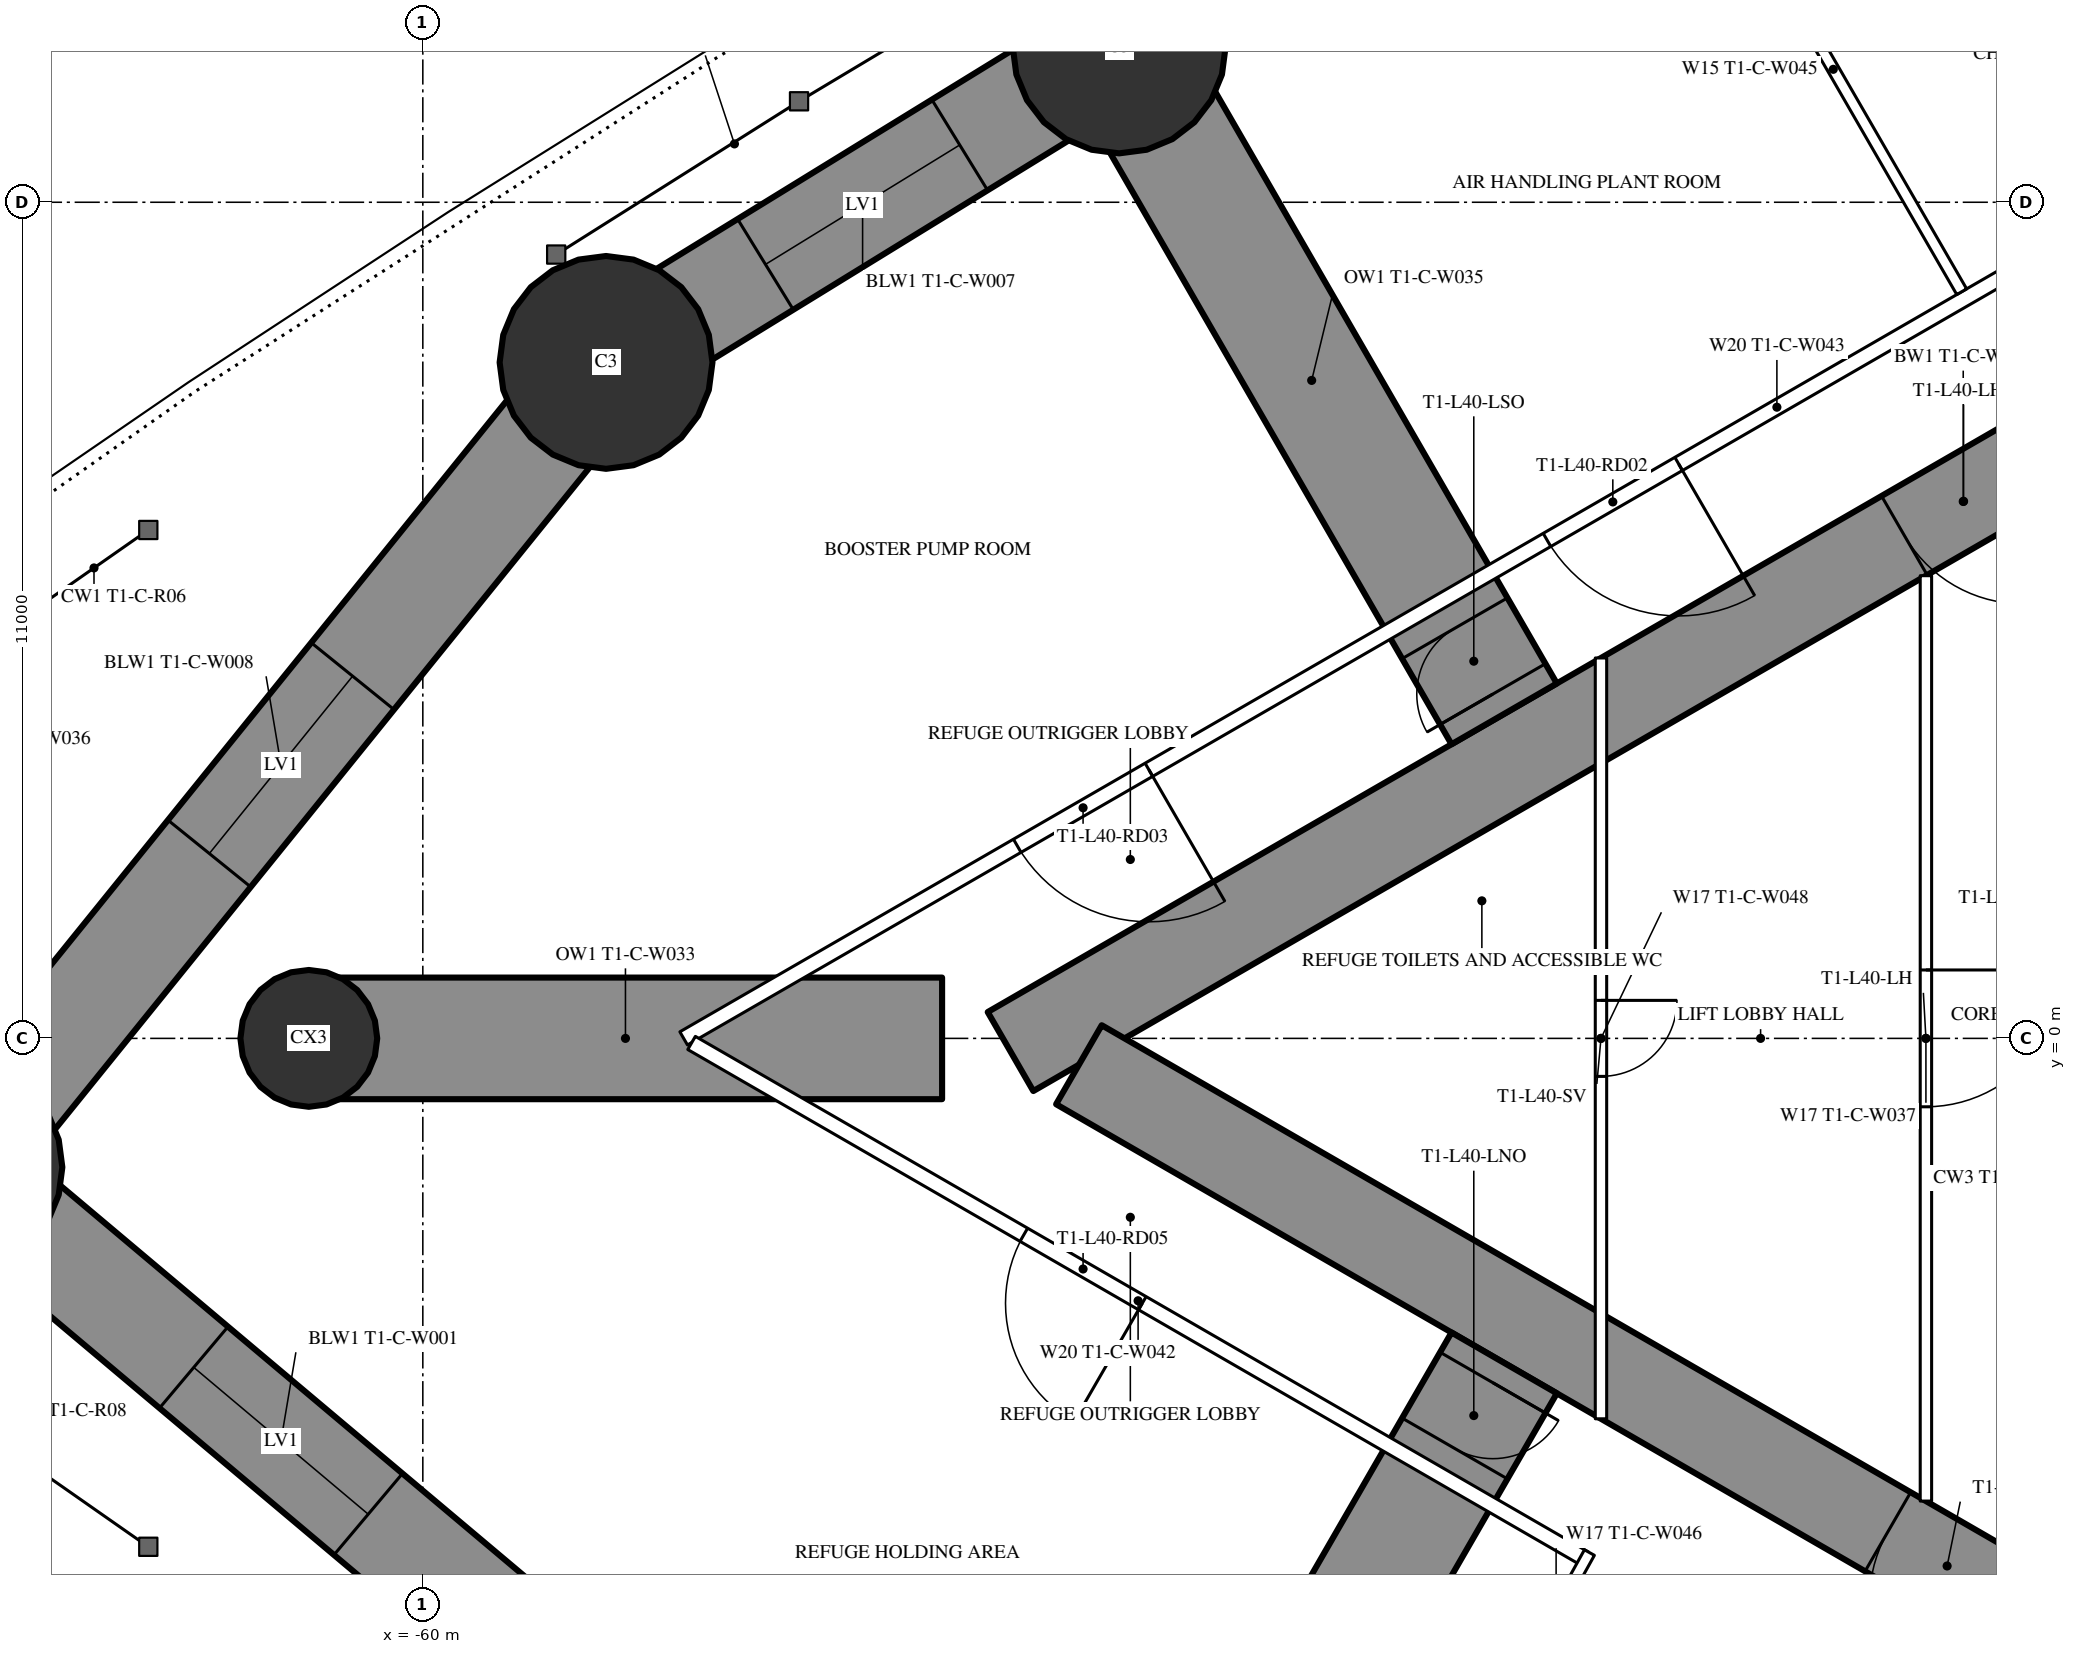
"""IFC4 building model, lengths in metres.
Left out: names, types, materials, properties, quantities, classifications, styles, units other than length and angle.
Written with IfcOpenShell. Run it as: python <this file> out.ifc"""

import sys

from ifc_helpers import new_model, si_unit, direction, frame, frame_2d, origin, origin_2d, place, context, subcontext, project, spatial, rectangle, circle, extrude, element, fill, save


model = new_model("IFC4")
c1 = context("Model", 3, precision=1e-05, world=origin(), true_north=direction((0.0, 1.0)))
c2 = subcontext(c1, "Body", "Model", "MODEL_VIEW")
j1 = project(units=[si_unit("LENGTHUNIT", "METRE"), si_unit("PLANEANGLEUNIT", "RADIAN")], contexts=[c1])
p1 = place(None, origin())
s1 = spatial("IfcSite", under=j1, at=p1, CompositionType="ELEMENT")
p2 = place(p1, origin())
s2 = spatial("IfcBuilding", under=s1, at=p2, CompositionType="ELEMENT")
p3 = place(p2, frame((0.0, 0.0, 152.7)))
s3 = spatial("IfcBuildingStorey", under=s2, at=p3, CompositionType="ELEMENT", Elevation=152.7)
for number, where, z_axis, x_axis in (
    (1, (-66.143, -1.695, 0.0), (0.0, 0.0, 1.0), (1.0, 0.0, 0.0)),
    (2, (-50.839, 13.043, 0.0), (0.0, 0.0, 1.0), (1.0, 0.0, 0.0)),
    (3, (-57.59, 8.893, 0.0), (0.0, 0.0, 1.0), (1.0, 0.0, 0.0)),
):
    element("IfcColumn", number, at=place(p3, frame(where, z_axis=z_axis, x_axis=x_axis)), inside=s3, PredefinedType="COLUMN", context=c2, shape_type="SweptSolid", body=[
        extrude(circle(Radius=1.4, at=origin_2d()), origin(), (0.0, 0.0, 1.0), 3.6),
    ])
p4 = place(p3, frame((-61.5, 0.0, 0.0), z_axis=(0.0, 0.0, 1.0), x_axis=(1.0, 0.0, 0.0)))
e4 = element("IfcColumn", 4, at=p4, inside=s3, PredefinedType="COLUMN", context=c2, shape_type="SweptSolid", body=[
    extrude(circle(Radius=0.9, at=origin_2d()), origin(), (0.0, 0.0, 1.0), 3.6),
])
p5 = place(p3, frame((-27.2, 14.3, 0.0), z_axis=(0.0, 0.0, 1.0), x_axis=(-0.866026593062, -0.499997940104, 0.0)))
e5 = element("IfcWall", 5, at=p5, inside=s3, PredefinedType="SHEAR", context=c2, shape_type="SweptSolid", body=[
    extrude(rectangle(XDim=28.946, YDim=1.2, at=frame_2d((14.473, 0.0))), origin(), (0.0, 0.0, 1.0), 3.6),
])
p6 = place(p5, frame((4.6, 0.0, 0.0)))
e6 = element("IfcOpeningElement", 6, at=p6, cuts=e5, PredefinedType="OPENING", context=c2, shape_type="SweptSolid", body=[
    extrude(rectangle(XDim=1.0, YDim=2.2, at=frame_2d((0.5, 1.1))), frame((0.0, 0.61, 0.0), z_axis=(0.0, -1.0, 0.0), x_axis=(1.0, 0.0, 0.0)), (0.0, 0.0, 1.0), 1.22),
])
p7 = place(p5, frame((13.568, 0.0, 0.0)))
e7 = element("IfcOpeningElement", 7, at=p7, cuts=e5, PredefinedType="OPENING", context=c2, shape_type="SweptSolid", body=[
    extrude(rectangle(XDim=1.8, YDim=2.04, at=frame_2d((0.9, 1.02))), frame((0.0, 0.61, 0.0), z_axis=(0.0, -1.0, 0.0), x_axis=(1.0, 0.0, 0.0)), (0.0, 0.0, 1.0), 1.22),
])
p8 = place(p3, frame((-27.2, -14.3, 0.0), z_axis=(0.0, 0.0, 1.0), x_axis=(-0.866024021859, 0.500002393557, 0.0)))
e8 = element("IfcWall", 8, at=p8, inside=s3, PredefinedType="SHEAR", context=c2, shape_type="SweptSolid", body=[
    extrude(rectangle(XDim=27.907, YDim=1.2, at=frame_2d((13.954, 0.0))), origin(), (0.0, 0.0, 1.0), 3.6),
])
p9 = place(p8, frame((4.6, 0.0, 0.0)))
e9 = element("IfcOpeningElement", 9, at=p9, cuts=e8, PredefinedType="OPENING", context=c2, shape_type="SweptSolid", body=[
    extrude(rectangle(XDim=1.0, YDim=2.2, at=frame_2d((0.5, 1.1))), frame((0.0, 0.61, 0.0), z_axis=(0.0, -1.0, 0.0), x_axis=(1.0, 0.0, 0.0)), (0.0, 0.0, 1.0), 1.22),
])
p10 = place(p8, frame((13.818, 0.0, 0.0)))
e10 = element("IfcOpeningElement", 10, at=p10, cuts=e8, PredefinedType="OPENING", context=c2, shape_type="SweptSolid", body=[
    extrude(rectangle(XDim=1.8, YDim=2.2, at=frame_2d((0.9, 1.1))), frame((0.0, 0.61, 0.0), z_axis=(0.0, -1.0, 0.0), x_axis=(1.0, 0.0, 0.0)), (0.0, 0.0, 1.0), 1.22),
])
p11 = place(p3, frame((-45.773, 4.27, 0.0), z_axis=(0.0, 0.0, 1.0), x_axis=(-0.499995723283, 0.866027872934, 0.0)))
e11 = element("IfcWall", 11, at=p11, inside=s3, PredefinedType="SHEAR", context=c2, shape_type="SweptSolid", body=[
    extrude(rectangle(XDim=10.131, YDim=1.6, at=frame_2d((5.065, 0.0))), origin(), (0.0, 0.0, 1.0), 3.6),
])
p12 = place(p11, frame((0.3, 0.0, 0.0)))
e12 = element("IfcOpeningElement", 12, at=p12, cuts=e11, PredefinedType="OPENING", context=c2, shape_type="SweptSolid", body=[
    extrude(rectangle(XDim=1.0, YDim=2.2, at=frame_2d((0.5, 1.1))), frame((0.0, 0.81, 0.0), z_axis=(0.0, -1.0, 0.0), x_axis=(1.0, 0.0, 0.0)), (0.0, 0.0, 1.0), 1.62),
])
p13 = place(p3, frame((-53.168, 0.0, 0.0), z_axis=(0.0, 0.0, 1.0), x_axis=(-1.0, 0.0, 0.0)))
e13 = element("IfcWall", 13, at=p13, inside=s3, PredefinedType="SHEAR", context=c2, shape_type="SweptSolid", body=[
    extrude(rectangle(XDim=8.332, YDim=1.6, at=frame_2d((4.166, 0.0))), origin(), (0.0, 0.0, 1.0), 3.6),
])
p14 = place(p3, frame((-45.773, -4.27, 0.0), z_axis=(0.0, 0.0, 1.0), x_axis=(-0.499995723283, -0.866027872934, 0.0)))
e14 = element("IfcWall", 14, at=p14, inside=s3, PredefinedType="SHEAR", context=c2, shape_type="SweptSolid", body=[
    extrude(rectangle(XDim=10.131, YDim=1.6, at=frame_2d((5.065, 0.0))), origin(), (0.0, 0.0, 1.0), 3.6),
])
p15 = place(p14, frame((0.3, 0.0, 0.0)))
e15 = element("IfcOpeningElement", 15, at=p15, cuts=e14, PredefinedType="OPENING", context=c2, shape_type="SweptSolid", body=[
    extrude(rectangle(XDim=1.0, YDim=2.2, at=frame_2d((0.5, 1.1))), frame((0.0, 0.81, 0.0), z_axis=(0.0, -1.0, 0.0), x_axis=(1.0, 0.0, 0.0)), (0.0, 0.0, 1.0), 1.62),
])
p16 = place(p3, frame((-43.9, 16.871, 0.0), z_axis=(0.0, 0.0, 1.0), x_axis=(-0.875577684027, -0.483077342911, 0.0)))
e16 = element("IfcWall", 16, at=p16, inside=s3, PredefinedType="SHEAR", context=c2, shape_type="SweptSolid", body=[
    extrude(rectangle(XDim=7.925, YDim=1.4, at=frame_2d((3.962, 0.0))), origin(), (0.0, 0.0, 1.0), 3.6),
])
p17 = place(p16, frame((2.462, 0.0, 0.6)))
e17 = element("IfcOpeningElement", 17, at=p17, cuts=e16, PredefinedType="OPENING", context=c2, shape_type="SweptSolid", body=[
    extrude(rectangle(XDim=3.0, YDim=1.2, at=frame_2d((1.5, 0.6))), frame((0.0, 0.71, 0.0), z_axis=(0.0, -1.0, 0.0), x_axis=(1.0, 0.0, 0.0)), (0.0, 0.0, 1.0), 1.42),
])
p18 = place(p3, frame((-50.839, 13.043, 0.0), z_axis=(0.0, 0.0, 1.0), x_axis=(-0.851892008043, -0.523717487423, 0.0)))
e18 = element("IfcWall", 18, at=p18, inside=s3, PredefinedType="SHEAR", context=c2, shape_type="SweptSolid", body=[
    extrude(rectangle(XDim=7.924, YDim=1.4, at=frame_2d((3.962, 0.0))), origin(), (0.0, 0.0, 1.0), 3.6),
])
p19 = place(p18, frame((2.462, 0.0, 0.6)))
e19 = element("IfcOpeningElement", 19, at=p19, cuts=e18, PredefinedType="OPENING", context=c2, shape_type="SweptSolid", body=[
    extrude(rectangle(XDim=3.0, YDim=1.2, at=frame_2d((1.5, 0.6))), frame((0.0, 0.71, 0.0), z_axis=(0.0, -1.0, 0.0), x_axis=(1.0, 0.0, 0.0)), (0.0, 0.0, 1.0), 1.42),
])
p20 = place(p3, frame((-57.59, 8.893, 0.0), z_axis=(0.0, 0.0, 1.0), x_axis=(-0.628373846765, -0.777911504416, 0.0)))
e20 = element("IfcWall", 20, at=p20, inside=s3, PredefinedType="SHEAR", context=c2, shape_type="SweptSolid", body=[
    extrude(rectangle(XDim=13.611, YDim=1.4, at=frame_2d((6.806, 0.0))), origin(), (0.0, 0.0, 1.0), 3.6),
])
p21 = place(p20, frame((5.306, 0.0, 0.6)))
e21 = element("IfcOpeningElement", 21, at=p21, cuts=e20, PredefinedType="OPENING", context=c2, shape_type="SweptSolid", body=[
    extrude(rectangle(XDim=3.0, YDim=1.2, at=frame_2d((1.5, 0.6))), frame((0.0, 0.71, 0.0), z_axis=(0.0, -1.0, 0.0), x_axis=(1.0, 0.0, 0.0)), (0.0, 0.0, 1.0), 1.42),
])
p22 = place(p3, frame((-66.143, -1.695, 0.0), z_axis=(0.0, 0.0, 1.0), x_axis=(0.765120708367, -0.64388687021, 0.0)))
e22 = element("IfcWall", 22, at=p22, inside=s3, PredefinedType="SHEAR", context=c2, shape_type="SweptSolid", body=[
    extrude(rectangle(XDim=11.179, YDim=1.4, at=frame_2d((5.589, 0.0))), origin(), (0.0, 0.0, 1.0), 3.6),
])
p23 = place(p22, frame((4.089, 0.0, 0.6)))
e23 = element("IfcOpeningElement", 23, at=p23, cuts=e22, PredefinedType="OPENING", context=c2, shape_type="SweptSolid", body=[
    extrude(rectangle(XDim=3.0, YDim=1.2, at=frame_2d((1.5, 0.6))), frame((0.0, 0.71, 0.0), z_axis=(0.0, -1.0, 0.0), x_axis=(1.0, 0.0, 0.0)), (0.0, 0.0, 1.0), 1.42),
])
p24 = place(p3, frame((-27.803, 16.608, 0.0), z_axis=(0.0, 0.0, 1.0), x_axis=(-0.866025851808, -0.499999223999, 0.0)))
e24 = element("IfcWall", 24, at=p24, inside=s3, PredefinedType="PARTITIONING", context=c2, shape_type="SweptSolid", body=[
    extrude(rectangle(XDim=33.215, YDim=0.2, at=frame_2d((16.608, 0.0))), origin(), (0.0, 0.0, 1.0), 3.35),
])
p25 = place(p24, frame((4.584, 0.0, 0.0)))
e25 = element("IfcOpeningElement", 25, at=p25, cuts=e24, PredefinedType="OPENING", context=c2, shape_type="SweptSolid", body=[
    extrude(rectangle(XDim=2.0, YDim=2.4, at=frame_2d((1.0, 1.2))), frame((0.0, 0.11, 0.0), z_axis=(0.0, -1.0, 0.0), x_axis=(1.0, 0.0, 0.0)), (0.0, 0.0, 1.0), 0.22),
])
p26 = place(p24, frame((18.1, 0.0, 0.0)))
e26 = element("IfcOpeningElement", 26, at=p26, cuts=e24, PredefinedType="OPENING", context=c2, shape_type="SweptSolid", body=[
    extrude(rectangle(XDim=2.0, YDim=2.4, at=frame_2d((1.0, 1.2))), frame((0.0, 0.11, 0.0), z_axis=(0.0, -1.0, 0.0), x_axis=(1.0, 0.0, 0.0)), (0.0, 0.0, 1.0), 0.22),
])
p27 = place(p24, frame((26.147, 0.0, 0.0)))
e27 = element("IfcOpeningElement", 27, at=p27, cuts=e24, PredefinedType="OPENING", context=c2, shape_type="SweptSolid", body=[
    extrude(rectangle(XDim=2.0, YDim=2.4, at=frame_2d((1.0, 1.2))), frame((0.0, 0.11, 0.0), z_axis=(0.0, -1.0, 0.0), x_axis=(1.0, 0.0, 0.0)), (0.0, 0.0, 1.0), 0.22),
])
p28 = place(p3, frame((-39.754, 9.823, 0.0), z_axis=(0.0, 0.0, 1.0), x_axis=(-0.499997670926, 0.866026748472, 0.0)))
e28 = element("IfcWall", 28, at=p28, inside=s3, PredefinedType="PARTITIONING", context=c2, shape_type="SweptSolid", body=[
    extrude(rectangle(XDim=6.757, YDim=0.15, at=frame_2d((3.379, 0.0))), origin(), (0.0, 0.0, 1.0), 2.4),
])
p29 = place(p3, frame((-44.715, -6.844, 0.0), z_axis=(0.0, 0.0, 1.0), x_axis=(-0.866025261224, 0.500000246922, 0.0)))
e29 = element("IfcWall", 29, at=p29, inside=s3, PredefinedType="PARTITIONING", context=c2, shape_type="SweptSolid", body=[
    extrude(rectangle(XDim=13.567, YDim=0.2, at=frame_2d((6.783, 0.0))), origin(), (0.0, 0.0, 1.0), 3.35),
])
p30 = place(p29, frame((6.719, 0.0, 0.0)))
e30 = element("IfcOpeningElement", 30, at=p30, cuts=e29, PredefinedType="OPENING", context=c2, shape_type="SweptSolid", body=[
    extrude(rectangle(XDim=1.8, YDim=2.2, at=frame_2d((0.9, 1.1))), frame((0.0, 0.11, 0.0), z_axis=(0.0, -1.0, 0.0), x_axis=(1.0, 0.0, 0.0)), (0.0, 0.0, 1.0), 0.22),
])
p31 = place(p3, frame((-44.652, -6.764, 0.0), z_axis=(0.0, 0.0, 1.0), x_axis=(-0.485528096672, -0.8742210632, 0.0)))
e31 = element("IfcWall", 31, at=p31, inside=s3, PredefinedType="PARTITIONING", context=c2, shape_type="SweptSolid", body=[
    extrude(rectangle(XDim=1.805, YDim=0.15, at=frame_2d((0.903, 0.0))), origin(), (0.0, 0.0, 1.0), 3.35),
])
p32 = place(p31, frame((0.453, 0.0, 0.0)))
e32 = element("IfcOpeningElement", 32, at=p32, cuts=e31, PredefinedType="OPENING", context=c2, shape_type="SweptSolid", body=[
    extrude(rectangle(XDim=0.9, YDim=2.04, at=frame_2d((0.45, 1.02))), frame((0.0, 0.085, 0.0), z_axis=(0.0, -1.0, 0.0), x_axis=(1.0, 0.0, 0.0)), (0.0, 0.0, 1.0), 0.17),
])
p33 = place(p3, frame((-40.225, 6.087, 0.0), z_axis=(0.0, 0.0, 1.0), x_axis=(0.0, -1.0, 0.0)))
e33 = element("IfcWall", 33, at=p33, inside=s3, PredefinedType="PARTITIONING", context=c2, shape_type="SweptSolid", body=[
    extrude(rectangle(XDim=12.174, YDim=0.15, at=frame_2d((6.087, 0.0))), origin(), (0.0, 0.0, 1.0), 3.35),
])
p34 = place(p33, frame((5.187, 0.0, 0.0)))
e34 = element("IfcOpeningElement", 34, at=p34, cuts=e33, PredefinedType="OPENING", context=c2, shape_type="SweptSolid", body=[
    extrude(rectangle(XDim=1.8, YDim=2.2, at=frame_2d((0.9, 1.1))), frame((0.0, 0.085, 0.0), z_axis=(0.0, -1.0, 0.0), x_axis=(1.0, 0.0, 0.0)), (0.0, 0.0, 1.0), 0.17),
])
p35 = place(p3, frame((-44.5, 5.005, 0.0), z_axis=(0.0, 0.0, 1.0), x_axis=(0.0, -1.0, 0.0)))
e35 = element("IfcWall", 35, at=p35, inside=s3, PredefinedType="PARTITIONING", context=c2, shape_type="SweptSolid", body=[
    extrude(rectangle(XDim=10.009, YDim=0.15, at=frame_2d((5.005, 0.0))), origin(), (0.0, 0.0, 1.0), 3.35),
])
p36 = place(p35, frame((4.505, 0.0, 0.0)))
e36 = element("IfcOpeningElement", 36, at=p36, cuts=e35, PredefinedType="OPENING", context=c2, shape_type="SweptSolid", body=[
    extrude(rectangle(XDim=1.0, YDim=2.2, at=frame_2d((0.5, 1.1))), frame((0.0, 0.085, 0.0), z_axis=(0.0, -1.0, 0.0), x_axis=(1.0, 0.0, 0.0)), (0.0, 0.0, 1.0), 0.17),
])
p37 = place(p19, origin())
e37 = element("IfcWindow", 37, at=p37, inside=s3, PartitioningType="SINGLE_PANEL", PredefinedType="WINDOW", context=c2, shape_type="SweptSolid", body=[
    extrude(rectangle(XDim=3.0, YDim=1.2, at=frame_2d((1.5, 0.6))), frame((0.0, 0.03, 0.0), z_axis=(0.0, -1.0, 0.0), x_axis=(1.0, 0.0, 0.0)), (0.0, 0.0, 1.0), 0.06),
])
fill(e19, e37)
p38 = place(p21, origin())
e38 = element("IfcWindow", 38, at=p38, inside=s3, PartitioningType="SINGLE_PANEL", PredefinedType="WINDOW", context=c2, shape_type="SweptSolid", body=[
    extrude(rectangle(XDim=3.0, YDim=1.2, at=frame_2d((1.5, 0.6))), frame((0.0, 0.03, 0.0), z_axis=(0.0, -1.0, 0.0), x_axis=(1.0, 0.0, 0.0)), (0.0, 0.0, 1.0), 0.06),
])
fill(e21, e38)
p39 = place(p23, origin())
e39 = element("IfcWindow", 39, at=p39, inside=s3, PartitioningType="SINGLE_PANEL", PredefinedType="WINDOW", context=c2, shape_type="SweptSolid", body=[
    extrude(rectangle(XDim=3.0, YDim=1.2, at=frame_2d((1.5, 0.6))), frame((0.0, 0.03, 0.0), z_axis=(0.0, -1.0, 0.0), x_axis=(1.0, 0.0, 0.0)), (0.0, 0.0, 1.0), 0.06),
])
fill(e23, e39)
p40 = place(p12, origin())
e40 = element("IfcDoor", 40, at=p40, inside=s3, OperationType="SINGLE_SWING_LEFT", PredefinedType="DOOR", context=c2, shape_type="SweptSolid", body=[
    extrude(rectangle(XDim=1.0, YDim=2.2, at=frame_2d((0.5, 1.1))), frame((0.0, 0.025, 0.0), z_axis=(0.0, -1.0, 0.0), x_axis=(1.0, 0.0, 0.0)), (0.0, 0.0, 1.0), 0.05),
])
fill(e12, e40)
p41 = place(p15, origin())
e41 = element("IfcDoor", 41, at=p41, inside=s3, OperationType="SINGLE_SWING_LEFT", PredefinedType="DOOR", context=c2, shape_type="SweptSolid", body=[
    extrude(rectangle(XDim=1.0, YDim=2.2, at=frame_2d((0.5, 1.1))), frame((0.0, 0.025, 0.0), z_axis=(0.0, -1.0, 0.0), x_axis=(1.0, 0.0, 0.0)), (0.0, 0.0, 1.0), 0.05),
])
fill(e15, e41)
p42 = place(p26, origin())
e42 = element("IfcDoor", 42, at=p42, inside=s3, OperationType="DOUBLE_DOOR_SINGLE_SWING", PredefinedType="DOOR", context=c2, shape_type="SweptSolid", body=[
    extrude(rectangle(XDim=2.0, YDim=2.4, at=frame_2d((1.0, 1.2))), frame((0.0, 0.025, 0.0), z_axis=(0.0, -1.0, 0.0), x_axis=(1.0, 0.0, 0.0)), (0.0, 0.0, 1.0), 0.05),
])
fill(e26, e42)
p43 = place(p27, origin())
e43 = element("IfcDoor", 43, at=p43, inside=s3, OperationType="DOUBLE_DOOR_SINGLE_SWING", PredefinedType="DOOR", context=c2, shape_type="SweptSolid", body=[
    extrude(rectangle(XDim=2.0, YDim=2.4, at=frame_2d((1.0, 1.2))), frame((0.0, 0.025, 0.0), z_axis=(0.0, -1.0, 0.0), x_axis=(1.0, 0.0, 0.0)), (0.0, 0.0, 1.0), 0.05),
])
fill(e27, e43)
p44 = place(p30, origin())
e44 = element("IfcDoor", 44, at=p44, inside=s3, OperationType="DOUBLE_DOOR_SINGLE_SWING", PredefinedType="DOOR", context=c2, shape_type="SweptSolid", body=[
    extrude(rectangle(XDim=1.8, YDim=2.2, at=frame_2d((0.9, 1.1))), frame((0.0, 0.025, 0.0), z_axis=(0.0, -1.0, 0.0), x_axis=(1.0, 0.0, 0.0)), (0.0, 0.0, 1.0), 0.05),
])
fill(e30, e44)
p45 = place(p34, origin())
e45 = element("IfcDoor", 45, at=p45, inside=s3, OperationType="DOUBLE_DOOR_SINGLE_SWING", PredefinedType="DOOR", context=c2, shape_type="SweptSolid", body=[
    extrude(rectangle(XDim=1.8, YDim=2.2, at=frame_2d((0.9, 1.1))), frame((0.0, 0.025, 0.0), z_axis=(0.0, -1.0, 0.0), x_axis=(1.0, 0.0, 0.0)), (0.0, 0.0, 1.0), 0.05),
])
fill(e34, e45)
p46 = place(p36, origin())
e46 = element("IfcDoor", 46, at=p46, inside=s3, OperationType="SINGLE_SWING_LEFT", PredefinedType="DOOR", context=c2, shape_type="SweptSolid", body=[
    extrude(rectangle(XDim=1.0, YDim=2.2, at=frame_2d((0.5, 1.1))), frame((0.0, 0.025, 0.0), z_axis=(0.0, -1.0, 0.0), x_axis=(1.0, 0.0, 0.0)), (0.0, 0.0, 1.0), 0.05),
])
fill(e36, e46)
p47 = place(p7, origin())
e47 = element("IfcDoor", 47, at=p47, inside=s3, OperationType="DOUBLE_DOOR_SINGLE_SWING", PredefinedType="DOOR", context=c2, shape_type="SweptSolid", body=[
    extrude(rectangle(XDim=1.8, YDim=2.04, at=frame_2d((0.9, 1.02))), frame((0.0, 0.025, 0.0), z_axis=(0.0, -1.0, 0.0), x_axis=(1.0, 0.0, 0.0)), (0.0, 0.0, 1.0), 0.05),
])
fill(e7, e47)
p48 = place(p10, origin())
e48 = element("IfcDoor", 48, at=p48, inside=s3, OperationType="DOUBLE_DOOR_SINGLE_SWING", PredefinedType="DOOR", context=c2, shape_type="SweptSolid", body=[
    extrude(rectangle(XDim=1.8, YDim=2.2, at=frame_2d((0.9, 1.1))), frame((0.0, 0.025, 0.0), z_axis=(0.0, -1.0, 0.0), x_axis=(1.0, 0.0, 0.0)), (0.0, 0.0, 1.0), 0.05),
])
fill(e10, e48)
save(model, sys.argv[1])
